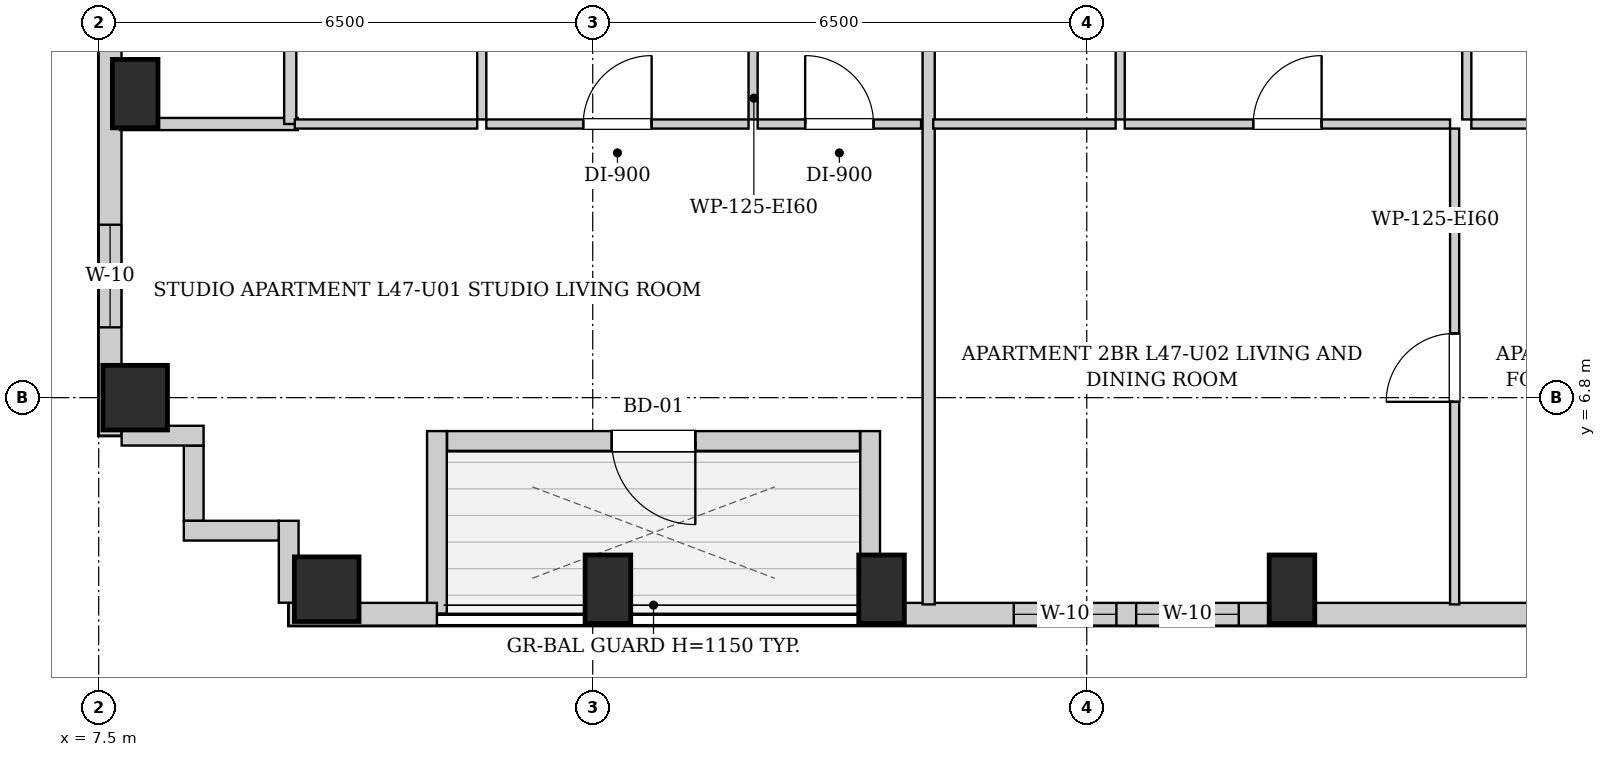
"""IFC4 building model, lengths in metres.
Left out: names, types, materials, properties, quantities, classifications, styles, units other than length and angle.
Written with IfcOpenShell. Run it as: python <this file> out.ifc"""

import sys

from ifc_helpers import new_model, si_unit, direction, frame, frame_2d, origin, origin_2d, place, context, subcontext, project, spatial, rectangle, extrude, element, fill, save


model = new_model("IFC4")
c1 = context("Model", 3, precision=1e-05, world=origin(), true_north=direction((0.0, 1.0)))
c2 = subcontext(c1, "Body", "Model", "MODEL_VIEW")
j1 = project(units=[si_unit("LENGTHUNIT", "METRE"), si_unit("PLANEANGLEUNIT", "RADIAN")], contexts=[c1])
p1 = place(None, origin())
s1 = spatial("IfcSite", under=j1, at=p1, CompositionType="ELEMENT")
p2 = place(p1, origin())
s2 = spatial("IfcBuilding", under=s1, at=p2, CompositionType="ELEMENT")
p3 = place(p2, frame((0.0, 0.0, 163.4)))
s3 = spatial("IfcBuildingStorey", under=s2, at=p3, CompositionType="ELEMENT", Elevation=163.4)
p4 = place(p3, frame((10.5, 4.28, 0.0), z_axis=(0.0, 0.0, 1.0), x_axis=(1.0, 0.0, 0.0)))
e1 = element("IfcColumn", 1, at=p4, inside=s3, PredefinedType="COLUMN", context=c2, shape_type="SweptSolid", body=[
    extrude(rectangle(XDim=0.85, YDim=0.85, at=origin_2d()), origin(), (0.0, 0.0, 1.0), 3.25),
])
for number, where, z_axis, x_axis in (
    (2, (14.2, 4.28, 0.0), (0.0, 0.0, 1.0), (1.0, 0.0, 0.0)),
    (3, (17.8, 4.28, 0.0), (0.0, 0.0, 1.0), (1.0, 0.0, 0.0)),
    (4, (23.2, 4.28, 0.0), (0.0, 0.0, 1.0), (1.0, 0.0, 0.0)),
):
    element("IfcColumn", number, at=place(p3, frame(where, z_axis=z_axis, x_axis=x_axis)), inside=s3, PredefinedType="COLUMN", context=c2, shape_type="SweptSolid", body=[
        extrude(rectangle(XDim=0.6, YDim=0.9, at=origin_2d()), origin(), (0.0, 0.0, 1.0), 3.25),
    ])
p5 = place(p3, frame((7.98, 6.8, 0.0), z_axis=(0.0, 0.0, 1.0), x_axis=(1.0, 0.0, 0.0)))
e5 = element("IfcColumn", 5, at=p5, inside=s3, PredefinedType="COLUMN", context=c2, shape_type="SweptSolid", body=[
    extrude(rectangle(XDim=0.85, YDim=0.85, at=origin_2d()), origin(), (0.0, 0.0, 1.0), 3.25),
])
p6 = place(p3, frame((7.98, 10.8, 0.0), z_axis=(0.0, 0.0, 1.0), x_axis=(1.0, 0.0, 0.0)))
e6 = element("IfcColumn", 6, at=p6, inside=s3, PredefinedType="COLUMN", context=c2, shape_type="SweptSolid", body=[
    extrude(rectangle(XDim=0.6, YDim=0.9, at=origin_2d()), origin(), (0.0, 0.0, 1.0), 3.25),
])
p7 = place(p3, frame((37.8, 3.95, 0.0), z_axis=(0.0, 0.0, 1.0), x_axis=(-1.0, 0.0, 0.0)))
e7 = element("IfcWall", 7, at=p7, inside=s3, PredefinedType="SOLIDWALL", context=c2, shape_type="SweptSolid", body=[
    extrude(rectangle(XDim=20.15, YDim=0.3, at=frame_2d((10.075, 0.0))), origin(), (0.0, 0.0, 1.0), 2.99),
])
p8 = place(p7, frame((15.3, 0.0, 0.55)))
e8 = element("IfcOpeningElement", 8, at=p8, cuts=e7, PredefinedType="OPENING", context=c2, shape_type="SweptSolid", body=[
    extrude(rectangle(XDim=1.35, YDim=1.2, at=frame_2d((0.675, 0.6))), frame((0.0, 0.16, 0.0), z_axis=(0.0, -1.0, 0.0), x_axis=(1.0, 0.0, 0.0)), (0.0, 0.0, 1.0), 0.32),
])
p9 = place(p7, frame((16.91, 0.0, 0.55)))
e9 = element("IfcOpeningElement", 9, at=p9, cuts=e7, PredefinedType="OPENING", context=c2, shape_type="SweptSolid", body=[
    extrude(rectangle(XDim=1.35, YDim=1.2, at=frame_2d((0.675, 0.6))), frame((0.0, 0.16, 0.0), z_axis=(0.0, -1.0, 0.0), x_axis=(1.0, 0.0, 0.0)), (0.0, 0.0, 1.0), 0.32),
])
p10 = place(p7, frame((8.95, 0.0, 0.55)))
e10 = element("IfcOpeningElement", 10, at=p10, cuts=e7, PredefinedType="OPENING", context=c2, shape_type="SweptSolid", body=[
    extrude(rectangle(XDim=1.35, YDim=1.2, at=frame_2d((0.675, 0.6))), frame((0.0, 0.16, 0.0), z_axis=(0.0, -1.0, 0.0), x_axis=(1.0, 0.0, 0.0)), (0.0, 0.0, 1.0), 0.32),
])
p11 = place(p7, frame((7.29, 0.0, 0.55)))
e11 = element("IfcOpeningElement", 11, at=p11, cuts=e7, PredefinedType="OPENING", context=c2, shape_type="SweptSolid", body=[
    extrude(rectangle(XDim=1.35, YDim=1.2, at=frame_2d((0.675, 0.6))), frame((0.0, 0.16, 0.0), z_axis=(0.0, -1.0, 0.0), x_axis=(1.0, 0.0, 0.0)), (0.0, 0.0, 1.0), 0.32),
])
p12 = place(p7, frame((5.06, 0.0, 0.55)))
e12 = element("IfcOpeningElement", 12, at=p12, cuts=e7, PredefinedType="OPENING", context=c2, shape_type="SweptSolid", body=[
    extrude(rectangle(XDim=1.35, YDim=1.2, at=frame_2d((0.675, 0.6))), frame((0.0, 0.16, 0.0), z_axis=(0.0, -1.0, 0.0), x_axis=(1.0, 0.0, 0.0)), (0.0, 0.0, 1.0), 0.32),
])
p13 = place(p3, frame((17.65, 3.96, 0.0), z_axis=(0.0, 0.0, 1.0), x_axis=(0.0, 1.0, 0.0)))
e13 = element("IfcWall", 13, at=p13, inside=s3, PredefinedType="SOLIDWALL", context=c2, shape_type="SweptSolid", body=[
    extrude(rectangle(XDim=2.4, YDim=0.26, at=frame_2d((1.2, 0.0))), origin(), (0.0, 0.0, 1.0), 2.99),
])
p14 = place(p3, frame((17.516, 6.23, 0.0), z_axis=(0.0, 0.0, 1.0), x_axis=(-1.0, 0.0, 0.0)))
e14 = element("IfcWall", 14, at=p14, inside=s3, PredefinedType="SOLIDWALL", context=c2, shape_type="SweptSolid", body=[
    extrude(rectangle(XDim=5.432, YDim=0.26, at=frame_2d((2.716, 0.0))), origin(), (0.0, 0.0, 1.0), 2.99),
])
p15 = place(p14, frame((2.166, 0.0, 0.0)))
e15 = element("IfcOpeningElement", 15, at=p15, cuts=e14, PredefinedType="OPENING", context=c2, shape_type="SweptSolid", body=[
    extrude(rectangle(XDim=1.1, YDim=2.0, at=frame_2d((0.55, 1.0))), frame((0.0, 0.14, 0.0), z_axis=(0.0, -1.0, 0.0), x_axis=(1.0, 0.0, 0.0)), (0.0, 0.0, 1.0), 0.28),
])
p16 = place(p3, frame((11.95, 6.36, 0.0), z_axis=(0.0, 0.0, 1.0), x_axis=(0.0, -1.0, 0.0)))
e16 = element("IfcWall", 16, at=p16, inside=s3, PredefinedType="SOLIDWALL", context=c2, shape_type="SweptSolid", body=[
    extrude(rectangle(XDim=2.4, YDim=0.26, at=frame_2d((1.2, 0.0))), origin(), (0.0, 0.0, 1.0), 2.99),
])
p17 = place(p3, frame((11.95, 3.95, 0.0), z_axis=(0.0, 0.0, 1.0), x_axis=(-1.0, 0.0, 0.0)))
e17 = element("IfcWall", 17, at=p17, inside=s3, PredefinedType="SOLIDWALL", context=c2, shape_type="SweptSolid", body=[
    extrude(rectangle(XDim=1.95, YDim=0.3, at=frame_2d((0.975, 0.0))), origin(), (0.0, 0.0, 1.0), 2.99),
])
p18 = place(p3, frame((7.65, 6.3, 0.0), z_axis=(0.0, 0.0, 1.0), x_axis=(0.0, 1.0, 0.0)))
e18 = element("IfcWall", 18, at=p18, inside=s3, PredefinedType="SOLIDWALL", context=c2, shape_type="SweptSolid", body=[
    extrude(rectangle(XDim=34.5, YDim=0.3, at=frame_2d((17.25, 0.0))), origin(), (0.0, 0.0, 1.0), 2.99),
])
p19 = place(p18, frame((1.425, 0.0, 0.55)))
e19 = element("IfcOpeningElement", 19, at=p19, cuts=e18, PredefinedType="OPENING", context=c2, shape_type="SweptSolid", body=[
    extrude(rectangle(XDim=1.35, YDim=1.2, at=frame_2d((0.675, 0.6))), frame((0.0, 0.16, 0.0), z_axis=(0.0, -1.0, 0.0), x_axis=(1.0, 0.0, 0.0)), (0.0, 0.0, 1.0), 0.32),
])
p20 = place(p18, frame((30.15, 0.0, 0.55)))
e20 = element("IfcOpeningElement", 20, at=p20, cuts=e18, PredefinedType="OPENING", context=c2, shape_type="SweptSolid", body=[
    extrude(rectangle(XDim=1.35, YDim=1.2, at=frame_2d((0.675, 0.6))), frame((0.0, 0.16, 0.0), z_axis=(0.0, -1.0, 0.0), x_axis=(1.0, 0.0, 0.0)), (0.0, 0.0, 1.0), 0.32),
])
p21 = place(p18, frame((28.31, 0.0, 0.55)))
e21 = element("IfcOpeningElement", 21, at=p21, cuts=e18, PredefinedType="OPENING", context=c2, shape_type="SweptSolid", body=[
    extrude(rectangle(XDim=1.35, YDim=1.2, at=frame_2d((0.675, 0.6))), frame((0.0, 0.16, 0.0), z_axis=(0.0, -1.0, 0.0), x_axis=(1.0, 0.0, 0.0)), (0.0, 0.0, 1.0), 0.32),
])
p22 = place(p18, frame((11.85, 0.0, 0.55)))
e22 = element("IfcOpeningElement", 22, at=p22, cuts=e18, PredefinedType="OPENING", context=c2, shape_type="SweptSolid", body=[
    extrude(rectangle(XDim=1.35, YDim=1.2, at=frame_2d((0.675, 0.6))), frame((0.0, 0.16, 0.0), z_axis=(0.0, -1.0, 0.0), x_axis=(1.0, 0.0, 0.0)), (0.0, 0.0, 1.0), 0.32),
])
p23 = place(p18, frame((9.31, 0.0, 0.55)))
e23 = element("IfcOpeningElement", 23, at=p23, cuts=e18, PredefinedType="OPENING", context=c2, shape_type="SweptSolid", body=[
    extrude(rectangle(XDim=1.35, YDim=1.2, at=frame_2d((0.675, 0.6))), frame((0.0, 0.16, 0.0), z_axis=(0.0, -1.0, 0.0), x_axis=(1.0, 0.0, 0.0)), (0.0, 0.0, 1.0), 0.32),
])
p24 = place(p18, frame((18.975, 0.0, 0.55)))
e24 = element("IfcOpeningElement", 24, at=p24, cuts=e18, PredefinedType="OPENING", context=c2, shape_type="SweptSolid", body=[
    extrude(rectangle(XDim=1.35, YDim=1.2, at=frame_2d((0.675, 0.6))), frame((0.0, 0.16, 0.0), z_axis=(0.0, -1.0, 0.0), x_axis=(1.0, 0.0, 0.0)), (0.0, 0.0, 1.0), 0.32),
])
p25 = place(p18, frame((20.585, 0.0, 0.55)))
e25 = element("IfcOpeningElement", 25, at=p25, cuts=e18, PredefinedType="OPENING", context=c2, shape_type="SweptSolid", body=[
    extrude(rectangle(XDim=1.35, YDim=1.2, at=frame_2d((0.675, 0.6))), frame((0.0, 0.16, 0.0), z_axis=(0.0, -1.0, 0.0), x_axis=(1.0, 0.0, 0.0)), (0.0, 0.0, 1.0), 0.32),
])
p26 = place(p3, frame((10.0, 4.102, 0.0), z_axis=(0.0, 0.0, 1.0), x_axis=(0.0, 1.0, 0.0)))
e26 = element("IfcWall", 26, at=p26, inside=s3, PredefinedType="SOLIDWALL", context=c2, shape_type="SweptSolid", body=[
    extrude(rectangle(XDim=1.078, YDim=0.26, at=frame_2d((0.539, 0.0))), origin(), (0.0, 0.0, 1.0), 2.99),
])
p27 = place(p3, frame((9.868, 5.05, 0.0), z_axis=(0.0, 0.0, 1.0), x_axis=(-1.0, 0.0, 0.0)))
e27 = element("IfcWall", 27, at=p27, inside=s3, PredefinedType="SOLIDWALL", context=c2, shape_type="SweptSolid", body=[
    extrude(rectangle(XDim=1.248, YDim=0.26, at=frame_2d((0.624, 0.0))), origin(), (0.0, 0.0, 1.0), 2.99),
])
p28 = place(p3, frame((8.75, 5.182, 0.0), z_axis=(0.0, 0.0, 1.0), x_axis=(0.0, 1.0, 0.0)))
e28 = element("IfcWall", 28, at=p28, inside=s3, PredefinedType="SOLIDWALL", context=c2, shape_type="SweptSolid", body=[
    extrude(rectangle(XDim=0.986, YDim=0.26, at=frame_2d((0.493, 0.0))), origin(), (0.0, 0.0, 1.0), 2.99),
])
p29 = place(p3, frame((8.88, 6.3, 0.0), z_axis=(0.0, 0.0, 1.0), x_axis=(-1.0, 0.0, 0.0)))
e29 = element("IfcWall", 29, at=p29, inside=s3, PredefinedType="SOLIDWALL", context=c2, shape_type="SweptSolid", body=[
    extrude(rectangle(XDim=1.078, YDim=0.26, at=frame_2d((0.539, 0.0))), origin(), (0.0, 0.0, 1.0), 2.99),
])
p30 = place(p3, frame((7.78, 10.4, 0.0), z_axis=(0.0, 0.0, 1.0), x_axis=(1.0, 0.0, 0.0)))
e30 = element("IfcWall", 30, at=p30, inside=s3, PredefinedType="PARTITIONING", context=c2, shape_type="SweptSolid", body=[
    extrude(rectangle(XDim=2.34, YDim=0.16, at=frame_2d((1.17, 0.0))), origin(), (0.0, 0.0, 1.0), 2.99),
])
p31 = place(p3, frame((10.02, 10.4, 0.0), z_axis=(0.0, 0.0, 1.0), x_axis=(0.0, 1.0, 0.0)))
e31 = element("IfcWall", 31, at=p31, inside=s3, PredefinedType="PARTITIONING", context=c2, shape_type="SweptSolid", body=[
    extrude(rectangle(XDim=2.91, YDim=0.16, at=frame_2d((1.455, 0.0))), origin(), (0.0, 0.0, 1.0), 2.99),
])
p32 = place(p3, frame((12.54, 10.46, 0.0), z_axis=(0.0, 0.0, 1.0), x_axis=(0.0, 1.0, 0.0)))
e32 = element("IfcWall", 32, at=p32, inside=s3, PredefinedType="PARTITIONING", context=c2, shape_type="SweptSolid", body=[
    extrude(rectangle(XDim=2.85, YDim=0.12, at=frame_2d((1.425, 0.0))), origin(), (0.0, 0.0, 1.0), 2.99),
])
p33 = place(p32, frame((0.995, 0.0, 0.0)))
e33 = element("IfcOpeningElement", 33, at=p33, cuts=e32, PredefinedType="OPENING", context=c2, shape_type="SweptSolid", body=[
    extrude(rectangle(XDim=0.86, YDim=2.05, at=frame_2d((0.43, 1.025))), frame((0.0, 0.07, 0.0), z_axis=(0.0, -1.0, 0.0), x_axis=(1.0, 0.0, 0.0)), (0.0, 0.0, 1.0), 0.14),
])
p34 = place(p3, frame((10.08, 10.4, 0.0), z_axis=(0.0, 0.0, 1.0), x_axis=(1.0, 0.0, 0.0)))
e34 = element("IfcWall", 34, at=p34, inside=s3, PredefinedType="PARTITIONING", context=c2, shape_type="SweptSolid", body=[
    extrude(rectangle(XDim=2.4, YDim=0.12, at=frame_2d((1.2, 0.0))), origin(), (0.0, 0.0, 1.0), 2.99),
])
p35 = place(p3, frame((16.11, 10.46, 0.0), z_axis=(0.0, 0.0, 1.0), x_axis=(0.0, 1.0, 0.0)))
e35 = element("IfcWall", 35, at=p35, inside=s3, PredefinedType="PARTITIONING", context=c2, shape_type="SweptSolid", body=[
    extrude(rectangle(XDim=2.85, YDim=0.12, at=frame_2d((1.425, 0.0))), origin(), (0.0, 0.0, 1.0), 2.99),
])
p36 = place(p35, frame((0.975, 0.0, 0.0)))
e36 = element("IfcOpeningElement", 36, at=p36, cuts=e35, PredefinedType="OPENING", context=c2, shape_type="SweptSolid", body=[
    extrude(rectangle(XDim=0.9, YDim=2.05, at=frame_2d((0.45, 1.025))), frame((0.0, 0.07, 0.0), z_axis=(0.0, -1.0, 0.0), x_axis=(1.0, 0.0, 0.0)), (0.0, 0.0, 1.0), 0.14),
])
p37 = place(p3, frame((12.6, 10.4, 0.0), z_axis=(0.0, 0.0, 1.0), x_axis=(1.0, 0.0, 0.0)))
e37 = element("IfcWall", 37, at=p37, inside=s3, PredefinedType="PARTITIONING", context=c2, shape_type="SweptSolid", body=[
    extrude(rectangle(XDim=3.45, YDim=0.12, at=frame_2d((1.725, 0.0))), origin(), (0.0, 0.0, 1.0), 2.99),
])
p38 = place(p37, frame((1.275, 0.0, 0.0)))
e38 = element("IfcOpeningElement", 38, at=p38, cuts=e37, PredefinedType="OPENING", context=c2, shape_type="SweptSolid", body=[
    extrude(rectangle(XDim=0.9, YDim=2.05, at=frame_2d((0.45, 1.025))), frame((0.0, 0.07, 0.0), z_axis=(0.0, -1.0, 0.0), x_axis=(1.0, 0.0, 0.0)), (0.0, 0.0, 1.0), 0.14),
])
p39 = place(p3, frame((16.17, 10.4, 0.0), z_axis=(0.0, 0.0, 1.0), x_axis=(1.0, 0.0, 0.0)))
e39 = element("IfcWall", 39, at=p39, inside=s3, PredefinedType="PARTITIONING", context=c2, shape_type="SweptSolid", body=[
    extrude(rectangle(XDim=2.15, YDim=0.12, at=frame_2d((1.075, 0.0))), origin(), (0.0, 0.0, 1.0), 2.99),
])
p40 = place(p39, frame((0.625, 0.0, 0.0)))
e40 = element("IfcOpeningElement", 40, at=p40, cuts=e39, PredefinedType="OPENING", context=c2, shape_type="SweptSolid", body=[
    extrude(rectangle(XDim=0.9, YDim=2.05, at=frame_2d((0.45, 1.025))), frame((0.0, 0.07, 0.0), z_axis=(0.0, -1.0, 0.0), x_axis=(1.0, 0.0, 0.0)), (0.0, 0.0, 1.0), 0.14),
])
p41 = place(p3, frame((18.42, 4.08, 0.0), z_axis=(0.0, 0.0, 1.0), x_axis=(0.0, 1.0, 0.0)))
e41 = element("IfcWall", 41, at=p41, inside=s3, PredefinedType="PARTITIONING", context=c2, shape_type="SweptSolid", body=[
    extrude(rectangle(XDim=9.23, YDim=0.16, at=frame_2d((4.615, 0.0))), origin(), (0.0, 0.0, 1.0), 2.99),
])
p42 = place(p3, frame((20.94, 10.46, 0.0), z_axis=(0.0, 0.0, 1.0), x_axis=(0.0, 1.0, 0.0)))
e42 = element("IfcWall", 42, at=p42, inside=s3, PredefinedType="PARTITIONING", context=c2, shape_type="SweptSolid", body=[
    extrude(rectangle(XDim=2.85, YDim=0.12, at=frame_2d((1.425, 0.0))), origin(), (0.0, 0.0, 1.0), 2.99),
])
p43 = place(p42, frame((0.995, 0.0, 0.0)))
e43 = element("IfcOpeningElement", 43, at=p43, cuts=e42, PredefinedType="OPENING", context=c2, shape_type="SweptSolid", body=[
    extrude(rectangle(XDim=0.86, YDim=2.05, at=frame_2d((0.43, 1.025))), frame((0.0, 0.07, 0.0), z_axis=(0.0, -1.0, 0.0), x_axis=(1.0, 0.0, 0.0)), (0.0, 0.0, 1.0), 0.14),
])
p44 = place(p3, frame((18.48, 10.4, 0.0), z_axis=(0.0, 0.0, 1.0), x_axis=(1.0, 0.0, 0.0)))
e44 = element("IfcWall", 44, at=p44, inside=s3, PredefinedType="PARTITIONING", context=c2, shape_type="SweptSolid", body=[
    extrude(rectangle(XDim=2.4, YDim=0.12, at=frame_2d((1.2, 0.0))), origin(), (0.0, 0.0, 1.0), 2.99),
])
p45 = place(p3, frame((25.5, 10.46, 0.0), z_axis=(0.0, 0.0, 1.0), x_axis=(0.0, 1.0, 0.0)))
e45 = element("IfcWall", 45, at=p45, inside=s3, PredefinedType="PARTITIONING", context=c2, shape_type="SweptSolid", body=[
    extrude(rectangle(XDim=2.85, YDim=0.12, at=frame_2d((1.425, 0.0))), origin(), (0.0, 0.0, 1.0), 2.99),
])
p46 = place(p45, frame((0.975, 0.0, 0.0)))
e46 = element("IfcOpeningElement", 46, at=p46, cuts=e45, PredefinedType="OPENING", context=c2, shape_type="SweptSolid", body=[
    extrude(rectangle(XDim=0.9, YDim=2.05, at=frame_2d((0.45, 1.025))), frame((0.0, 0.07, 0.0), z_axis=(0.0, -1.0, 0.0), x_axis=(1.0, 0.0, 0.0)), (0.0, 0.0, 1.0), 0.14),
])
p47 = place(p3, frame((21.0, 10.4, 0.0), z_axis=(0.0, 0.0, 1.0), x_axis=(1.0, 0.0, 0.0)))
e47 = element("IfcWall", 47, at=p47, inside=s3, PredefinedType="PARTITIONING", context=c2, shape_type="SweptSolid", body=[
    extrude(rectangle(XDim=4.28, YDim=0.12, at=frame_2d((2.14, 0.0))), origin(), (0.0, 0.0, 1.0), 2.99),
])
p48 = place(p47, frame((1.69, 0.0, 0.0)))
e48 = element("IfcOpeningElement", 48, at=p48, cuts=e47, PredefinedType="OPENING", context=c2, shape_type="SweptSolid", body=[
    extrude(rectangle(XDim=0.9, YDim=2.05, at=frame_2d((0.45, 1.025))), frame((0.0, 0.07, 0.0), z_axis=(0.0, -1.0, 0.0), x_axis=(1.0, 0.0, 0.0)), (0.0, 0.0, 1.0), 0.14),
])
p49 = place(p3, frame((25.56, 10.4, 0.0), z_axis=(0.0, 0.0, 1.0), x_axis=(1.0, 0.0, 0.0)))
e49 = element("IfcWall", 49, at=p49, inside=s3, PredefinedType="PARTITIONING", context=c2, shape_type="SweptSolid", body=[
    extrude(rectangle(XDim=3.15, YDim=0.12, at=frame_2d((1.575, 0.0))), origin(), (0.0, 0.0, 1.0), 2.99),
])
p50 = place(p49, frame((1.125, 0.0, 0.0)))
e50 = element("IfcOpeningElement", 50, at=p50, cuts=e49, PredefinedType="OPENING", context=c2, shape_type="SweptSolid", body=[
    extrude(rectangle(XDim=0.9, YDim=2.05, at=frame_2d((0.45, 1.025))), frame((0.0, 0.07, 0.0), z_axis=(0.0, -1.0, 0.0), x_axis=(1.0, 0.0, 0.0)), (0.0, 0.0, 1.0), 0.14),
])
p51 = place(p3, frame((25.34, 4.08, 0.0), z_axis=(0.0, 0.0, 1.0), x_axis=(0.0, 1.0, 0.0)))
e51 = element("IfcWall", 51, at=p51, inside=s3, PredefinedType="PARTITIONING", context=c2, shape_type="SweptSolid", body=[
    extrude(rectangle(XDim=6.26, YDim=0.12, at=frame_2d((3.13, 0.0))), origin(), (0.0, 0.0, 1.0), 2.99),
])
p52 = place(p51, frame((2.665, 0.0, 0.0)))
e52 = element("IfcOpeningElement", 52, at=p52, cuts=e51, PredefinedType="OPENING", context=c2, shape_type="SweptSolid", body=[
    extrude(rectangle(XDim=0.9, YDim=2.05, at=frame_2d((0.45, 1.025))), frame((0.0, 0.07, 0.0), z_axis=(0.0, -1.0, 0.0), x_axis=(1.0, 0.0, 0.0)), (0.0, 0.0, 1.0), 0.14),
])
p53 = place(p38, origin())
e53 = element("IfcDoor", 53, at=p53, inside=s3, OperationType="SINGLE_SWING_RIGHT", PredefinedType="DOOR", context=c2, shape_type="SweptSolid", body=[
    extrude(rectangle(XDim=0.9, YDim=2.05, at=frame_2d((0.45, 1.025))), frame((0.0, 0.025, 0.0), z_axis=(0.0, -1.0, 0.0), x_axis=(1.0, 0.0, 0.0)), (0.0, 0.0, 1.0), 0.05),
])
fill(e38, e53)
p54 = place(p40, origin())
e54 = element("IfcDoor", 54, at=p54, inside=s3, OperationType="SINGLE_SWING_LEFT", PredefinedType="DOOR", context=c2, shape_type="SweptSolid", body=[
    extrude(rectangle(XDim=0.9, YDim=2.05, at=frame_2d((0.45, 1.025))), frame((0.0, 0.025, 0.0), z_axis=(0.0, -1.0, 0.0), x_axis=(1.0, 0.0, 0.0)), (0.0, 0.0, 1.0), 0.05),
])
fill(e40, e54)
p55 = place(p48, origin())
e55 = element("IfcDoor", 55, at=p55, inside=s3, OperationType="SINGLE_SWING_RIGHT", PredefinedType="DOOR", context=c2, shape_type="SweptSolid", body=[
    extrude(rectangle(XDim=0.9, YDim=2.05, at=frame_2d((0.45, 1.025))), frame((0.0, 0.025, 0.0), z_axis=(0.0, -1.0, 0.0), x_axis=(1.0, 0.0, 0.0)), (0.0, 0.0, 1.0), 0.05),
])
fill(e48, e55)
p56 = place(p52, origin())
e56 = element("IfcDoor", 56, at=p56, inside=s3, OperationType="SINGLE_SWING_LEFT", PredefinedType="DOOR", context=c2, shape_type="SweptSolid", body=[
    extrude(rectangle(XDim=0.9, YDim=2.05, at=frame_2d((0.45, 1.025))), frame((0.0, 0.025, 0.0), z_axis=(0.0, -1.0, 0.0), x_axis=(1.0, 0.0, 0.0)), (0.0, 0.0, 1.0), 0.05),
])
fill(e52, e56)
p57 = place(p15, origin())
e57 = element("IfcDoor", 57, at=p57, inside=s3, OperationType="SINGLE_SWING_LEFT", PredefinedType="DOOR", context=c2, shape_type="SweptSolid", body=[
    extrude(rectangle(XDim=1.1, YDim=2.0, at=frame_2d((0.55, 1.0))), frame((0.0, 0.025, 0.0), z_axis=(0.0, -1.0, 0.0), x_axis=(1.0, 0.0, 0.0)), (0.0, 0.0, 1.0), 0.05),
])
fill(e15, e57)
p58 = place(p19, origin())
e58 = element("IfcWindow", 58, at=p58, inside=s3, PartitioningType="SINGLE_PANEL", PredefinedType="WINDOW", context=c2, shape_type="SweptSolid", body=[
    extrude(rectangle(XDim=1.35, YDim=1.2, at=frame_2d((0.675, 0.6))), frame((0.0, 0.03, 0.0), z_axis=(0.0, -1.0, 0.0), x_axis=(1.0, 0.0, 0.0)), (0.0, 0.0, 1.0), 0.06),
])
fill(e19, e58)
p59 = place(p8, origin())
e59 = element("IfcWindow", 59, at=p59, inside=s3, PartitioningType="SINGLE_PANEL", PredefinedType="WINDOW", context=c2, shape_type="SweptSolid", body=[
    extrude(rectangle(XDim=1.35, YDim=1.2, at=frame_2d((0.675, 0.6))), frame((0.0, 0.03, 0.0), z_axis=(0.0, -1.0, 0.0), x_axis=(1.0, 0.0, 0.0)), (0.0, 0.0, 1.0), 0.06),
])
fill(e8, e59)
p60 = place(p9, origin())
e60 = element("IfcWindow", 60, at=p60, inside=s3, PartitioningType="SINGLE_PANEL", PredefinedType="WINDOW", context=c2, shape_type="SweptSolid", body=[
    extrude(rectangle(XDim=1.35, YDim=1.2, at=frame_2d((0.675, 0.6))), frame((0.0, 0.03, 0.0), z_axis=(0.0, -1.0, 0.0), x_axis=(1.0, 0.0, 0.0)), (0.0, 0.0, 1.0), 0.06),
])
fill(e9, e60)
save(model, sys.argv[1])
